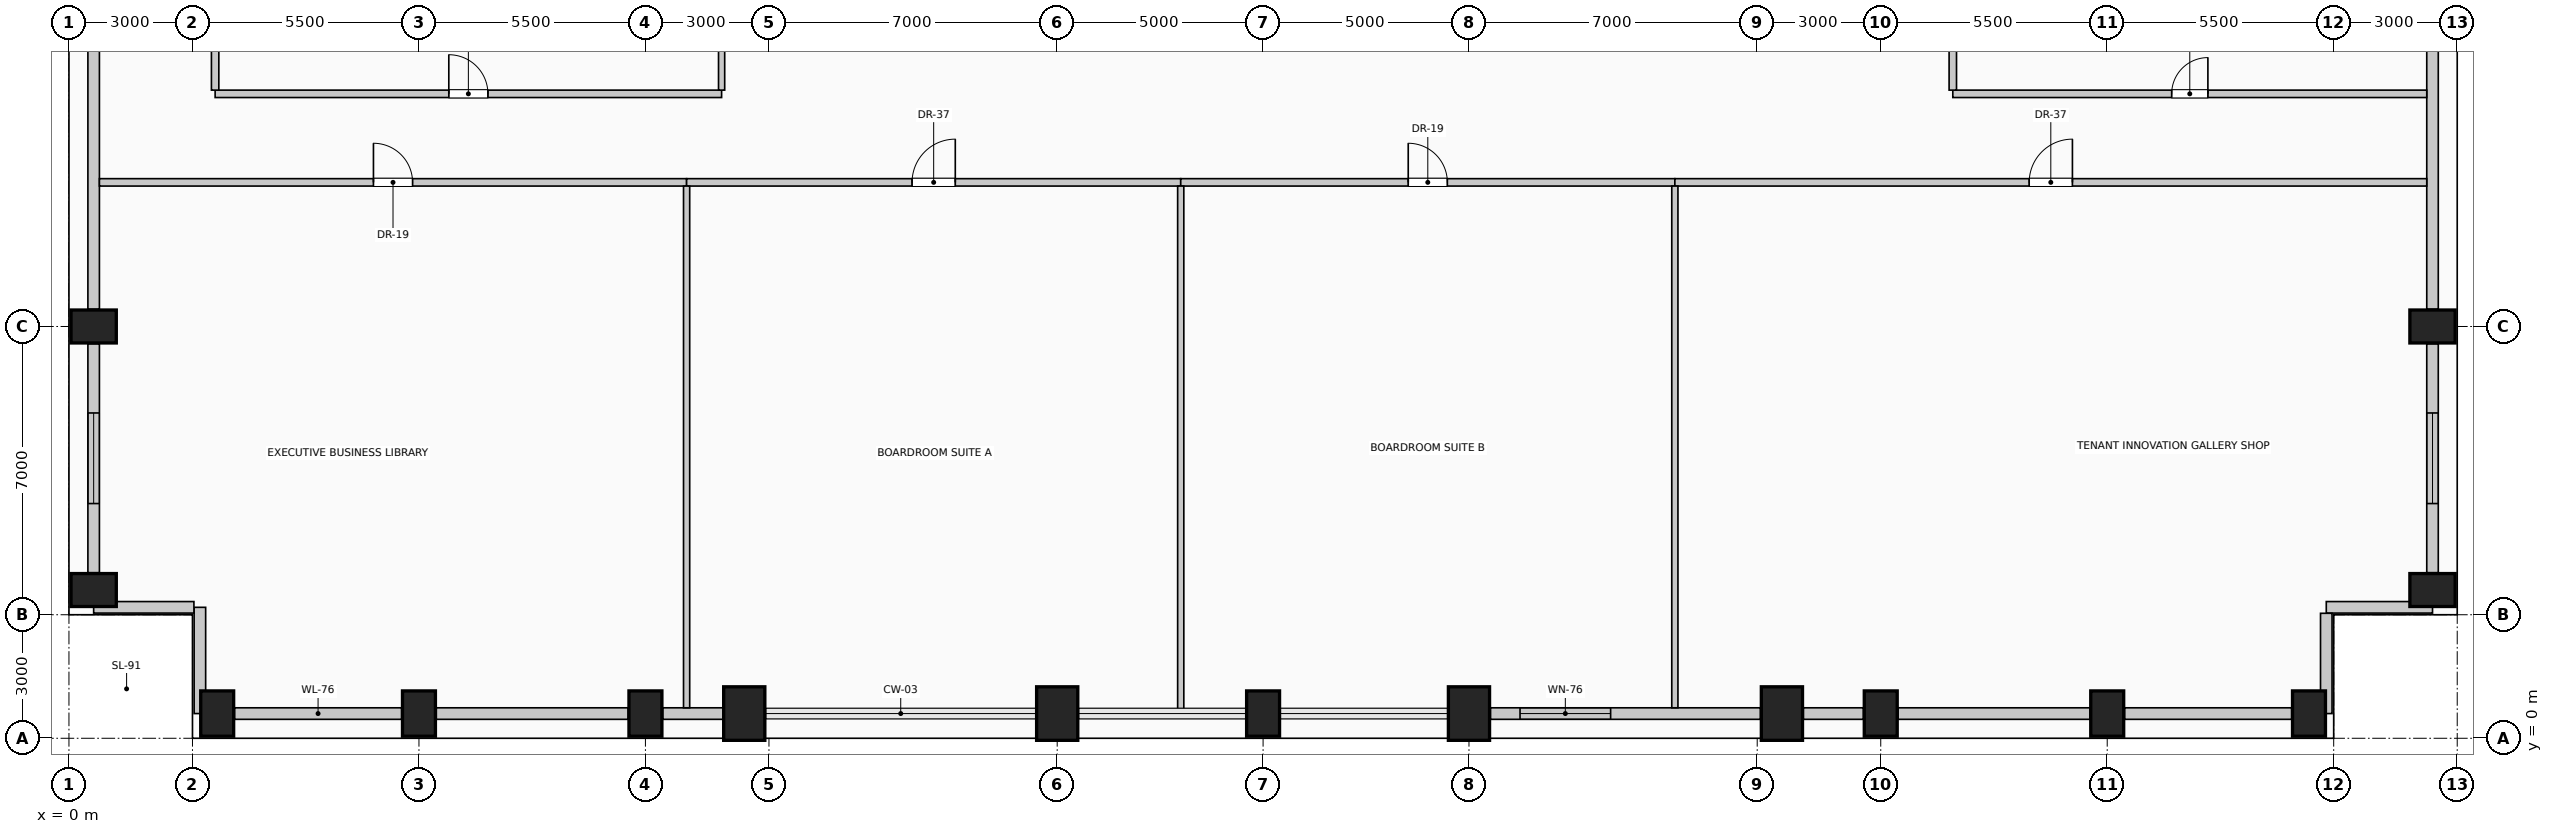
"""IFC4 building model, lengths in metres.
Left out: names, types, materials, properties, quantities, classifications, styles, units other than length and angle.
Written with IfcOpenShell. Run it as: python <this file> out.ifc"""

import sys

from ifc_helpers import new_model, si_unit, direction, frame, frame_2d, origin, origin_2d, place, context, subcontext, project, spatial, rectangle, extrude, element, fill, save


model = new_model("IFC4")
c1 = context("Model", 3, precision=1e-05, world=origin(), true_north=direction((0.0, 1.0)))
c2 = subcontext(c1, "Body", "Model", "MODEL_VIEW")
j1 = project(units=[si_unit("LENGTHUNIT", "METRE"), si_unit("PLANEANGLEUNIT", "RADIAN")], contexts=[c1])
p1 = place(None, origin())
s1 = spatial("IfcSite", under=j1, at=p1, CompositionType="ELEMENT")
p2 = place(p1, origin())
s2 = spatial("IfcBuilding", under=s1, at=p2, CompositionType="ELEMENT")
p3 = place(p2, frame((0.0, 0.0, 165.8)))
s3 = spatial("IfcBuildingStorey", under=s2, at=p3, CompositionType="ELEMENT", Elevation=165.8)
for number, where, z_axis, x_axis in (
    (1, (3.6, 0.6, 0.0), (0.0, 0.0, 1.0), (1.0, 0.0, 0.0)),
    (2, (8.5, 0.6, 0.0), (0.0, 0.0, 1.0), (1.0, 0.0, 0.0)),
    (3, (14.0, 0.6, 0.0), (0.0, 0.0, 1.0), (1.0, 0.0, 0.0)),
):
    element("IfcColumn", number, at=place(p3, frame(where, z_axis=z_axis, x_axis=x_axis)), inside=s3, PredefinedType="COLUMN", context=c2, shape_type="SweptSolid", body=[
        extrude(rectangle(XDim=0.8, YDim=1.1, at=origin_2d()), origin(), (0.0, 0.0, 1.0), 4.8),
    ])
for number, where, z_axis, x_axis in (
    (4, (16.4, 0.6, 0.0), (0.0, 0.0, 1.0), (1.0, 0.0, 0.0)),
    (5, (24.0, 0.6, 0.0), (0.0, 0.0, 1.0), (1.0, 0.0, 0.0)),
):
    element("IfcColumn", number, at=place(p3, frame(where, z_axis=z_axis, x_axis=x_axis)), inside=s3, PredefinedType="COLUMN", context=c2, shape_type="SweptSolid", body=[
        extrude(rectangle(XDim=1.0, YDim=1.3, at=origin_2d()), origin(), (0.0, 0.0, 1.0), 4.8),
    ])
p4 = place(p3, frame((29.0, 0.6, 0.0), z_axis=(0.0, 0.0, 1.0), x_axis=(1.0, 0.0, 0.0)))
e6 = element("IfcColumn", 6, at=p4, inside=s3, PredefinedType="COLUMN", context=c2, shape_type="SweptSolid", body=[
    extrude(rectangle(XDim=0.8, YDim=1.1, at=origin_2d()), origin(), (0.0, 0.0, 1.0), 4.8),
])
for number, where, z_axis, x_axis in (
    (7, (34.0, 0.6, 0.0), (0.0, 0.0, 1.0), (1.0, 0.0, 0.0)),
    (8, (41.6, 0.6, 0.0), (0.0, 0.0, 1.0), (1.0, 0.0, 0.0)),
):
    element("IfcColumn", number, at=place(p3, frame(where, z_axis=z_axis, x_axis=x_axis)), inside=s3, PredefinedType="COLUMN", context=c2, shape_type="SweptSolid", body=[
        extrude(rectangle(XDim=1.0, YDim=1.3, at=origin_2d()), origin(), (0.0, 0.0, 1.0), 4.8),
    ])
for number, where, z_axis, x_axis in (
    (9, (44.0, 0.6, 0.0), (0.0, 0.0, 1.0), (1.0, 0.0, 0.0)),
    (10, (49.5, 0.6, 0.0), (0.0, 0.0, 1.0), (1.0, 0.0, 0.0)),
    (11, (54.4, 0.6, 0.0), (0.0, 0.0, 1.0), (1.0, 0.0, 0.0)),
    (12, (0.6, 3.6, 0.0), (0.0, 0.0, 1.0), (0.0, 1.0, 0.0)),
    (13, (57.4, 3.6, 0.0), (0.0, 0.0, 1.0), (0.0, 1.0, 0.0)),
    (14, (0.6, 10.0, 0.0), (0.0, 0.0, 1.0), (0.0, 1.0, 0.0)),
    (15, (57.4, 10.0, 0.0), (0.0, 0.0, 1.0), (0.0, 1.0, 0.0)),
):
    element("IfcColumn", number, at=place(p3, frame(where, z_axis=z_axis, x_axis=x_axis)), inside=s3, PredefinedType="COLUMN", context=c2, shape_type="SweptSolid", body=[
        extrude(rectangle(XDim=0.8, YDim=1.1, at=origin_2d()), origin(), (0.0, 0.0, 1.0), 4.8),
    ])
p5 = place(p3, frame((8.08, 0.6, 0.0), z_axis=(0.0, 0.0, 1.0), x_axis=(-1.0, 0.0, 0.0)))
e16 = element("IfcWall", 16, at=p5, inside=s3, PredefinedType="SOLIDWALL", context=c2, shape_type="SweptSolid", body=[
    extrude(rectangle(XDim=4.06, YDim=0.28, at=frame_2d((2.03, 0.0))), origin(), (0.0, 0.0, 1.0), 3.675),
])
p6 = place(p3, frame((13.58, 0.6, 0.0), z_axis=(0.0, 0.0, 1.0), x_axis=(-1.0, 0.0, 0.0)))
e17 = element("IfcWall", 17, at=p6, inside=s3, PredefinedType="SOLIDWALL", context=c2, shape_type="SweptSolid", body=[
    extrude(rectangle(XDim=4.66, YDim=0.28, at=frame_2d((2.33, 0.0))), origin(), (0.0, 0.0, 1.0), 3.675),
])
p7 = place(p3, frame((15.88, 0.6, 0.0), z_axis=(0.0, 0.0, 1.0), x_axis=(-1.0, 0.0, 0.0)))
e18 = element("IfcWall", 18, at=p7, inside=s3, PredefinedType="SOLIDWALL", context=c2, shape_type="SweptSolid", body=[
    extrude(rectangle(XDim=1.46, YDim=0.28, at=frame_2d((0.73, 0.0))), origin(), (0.0, 0.0, 1.0), 3.675),
])
p8 = place(p3, frame((41.08, 0.6, 0.0), z_axis=(0.0, 0.0, 1.0), x_axis=(-1.0, 0.0, 0.0)))
e19 = element("IfcWall", 19, at=p8, inside=s3, PredefinedType="SOLIDWALL", context=c2, shape_type="SweptSolid", body=[
    extrude(rectangle(XDim=6.56, YDim=0.28, at=frame_2d((3.28, 0.0))), origin(), (0.0, 0.0, 1.0), 3.675),
])
p9 = place(p8, frame((3.64, 0.0, 0.5)))
e20 = element("IfcOpeningElement", 20, at=p9, cuts=e19, PredefinedType="OPENING", context=c2, shape_type="SweptSolid", body=[
    extrude(rectangle(XDim=2.2, YDim=1.95, at=frame_2d((1.1, 0.975))), frame((0.0, 0.15, 0.0), z_axis=(0.0, -1.0, 0.0), x_axis=(1.0, 0.0, 0.0)), (0.0, 0.0, 1.0), 0.3),
])
p10 = place(p3, frame((43.58, 0.6, 0.0), z_axis=(0.0, 0.0, 1.0), x_axis=(-1.0, 0.0, 0.0)))
e21 = element("IfcWall", 21, at=p10, inside=s3, PredefinedType="SOLIDWALL", context=c2, shape_type="SweptSolid", body=[
    extrude(rectangle(XDim=1.46, YDim=0.28, at=frame_2d((0.73, 0.0))), origin(), (0.0, 0.0, 1.0), 3.675),
])
p11 = place(p3, frame((49.08, 0.6, 0.0), z_axis=(0.0, 0.0, 1.0), x_axis=(-1.0, 0.0, 0.0)))
e22 = element("IfcWall", 22, at=p11, inside=s3, PredefinedType="SOLIDWALL", context=c2, shape_type="SweptSolid", body=[
    extrude(rectangle(XDim=4.66, YDim=0.28, at=frame_2d((2.33, 0.0))), origin(), (0.0, 0.0, 1.0), 3.675),
])
p12 = place(p3, frame((53.98, 0.6, 0.0), z_axis=(0.0, 0.0, 1.0), x_axis=(-1.0, 0.0, 0.0)))
e23 = element("IfcWall", 23, at=p12, inside=s3, PredefinedType="SOLIDWALL", context=c2, shape_type="SweptSolid", body=[
    extrude(rectangle(XDim=4.06, YDim=0.28, at=frame_2d((2.03, 0.0))), origin(), (0.0, 0.0, 1.0), 3.675),
])
p13 = place(p3, frame((0.6, 4.02, 0.0), z_axis=(0.0, 0.0, 1.0), x_axis=(0.0, 1.0, 0.0)))
e24 = element("IfcWall", 24, at=p13, inside=s3, PredefinedType="SOLIDWALL", context=c2, shape_type="SweptSolid", body=[
    extrude(rectangle(XDim=5.56, YDim=0.28, at=frame_2d((2.78, 0.0))), origin(), (0.0, 0.0, 1.0), 3.675),
])
p14 = place(p13, frame((1.68, 0.0, 0.5)))
e25 = element("IfcOpeningElement", 25, at=p14, cuts=e24, PredefinedType="OPENING", context=c2, shape_type="SweptSolid", body=[
    extrude(rectangle(XDim=2.2, YDim=1.95, at=frame_2d((1.1, 0.975))), frame((0.0, 0.15, 0.0), z_axis=(0.0, -1.0, 0.0), x_axis=(1.0, 0.0, 0.0)), (0.0, 0.0, 1.0), 0.3),
])
p15 = place(p3, frame((0.6, 10.42, 0.0), z_axis=(0.0, 0.0, 1.0), x_axis=(0.0, 1.0, 0.0)))
e26 = element("IfcWall", 26, at=p15, inside=s3, PredefinedType="SOLIDWALL", context=c2, shape_type="SweptSolid", body=[
    extrude(rectangle(XDim=7.16, YDim=0.28, at=frame_2d((3.58, 0.0))), origin(), (0.0, 0.0, 1.0), 3.675),
])
p16 = place(p3, frame((57.4, 9.58, 0.0), z_axis=(0.0, 0.0, 1.0), x_axis=(0.0, -1.0, 0.0)))
e27 = element("IfcWall", 27, at=p16, inside=s3, PredefinedType="SOLIDWALL", context=c2, shape_type="SweptSolid", body=[
    extrude(rectangle(XDim=5.56, YDim=0.28, at=frame_2d((2.78, 0.0))), origin(), (0.0, 0.0, 1.0), 3.675),
])
p17 = place(p16, frame((1.68, 0.0, 0.5)))
e28 = element("IfcOpeningElement", 28, at=p17, cuts=e27, PredefinedType="OPENING", context=c2, shape_type="SweptSolid", body=[
    extrude(rectangle(XDim=2.2, YDim=1.95, at=frame_2d((1.1, 0.975))), frame((0.0, 0.15, 0.0), z_axis=(0.0, -1.0, 0.0), x_axis=(1.0, 0.0, 0.0)), (0.0, 0.0, 1.0), 0.3),
])
p18 = place(p3, frame((57.4, 17.58, 0.0), z_axis=(0.0, 0.0, 1.0), x_axis=(0.0, -1.0, 0.0)))
e29 = element("IfcWall", 29, at=p18, inside=s3, PredefinedType="SOLIDWALL", context=c2, shape_type="SweptSolid", body=[
    extrude(rectangle(XDim=7.16, YDim=0.28, at=frame_2d((3.58, 0.0))), origin(), (0.0, 0.0, 1.0), 3.675),
])
p19 = place(p3, frame((57.4, 3.18, 0.0), z_axis=(0.0, 0.0, 1.0), x_axis=(-1.0, 0.0, 0.0)))
e30 = element("IfcWall", 30, at=p19, inside=s3, PredefinedType="SOLIDWALL", context=c2, shape_type="SweptSolid", body=[
    extrude(rectangle(XDim=2.58, YDim=0.28, at=frame_2d((1.29, 0.0))), origin(), (0.0, 0.0, 1.0), 4.525),
])
p20 = place(p3, frame((54.82, 3.035, 0.0), z_axis=(0.0, 0.0, 1.0), x_axis=(0.0, -1.0, 0.0)))
e31 = element("IfcWall", 31, at=p20, inside=s3, PredefinedType="SOLIDWALL", context=c2, shape_type="SweptSolid", body=[
    extrude(rectangle(XDim=2.435, YDim=0.28, at=frame_2d((1.217, 0.0))), origin(), (0.0, 0.0, 1.0), 4.525),
])
p21 = place(p3, frame((3.18, 0.6, 0.0), z_axis=(0.0, 0.0, 1.0), x_axis=(0.0, 1.0, 0.0)))
e32 = element("IfcWall", 32, at=p21, inside=s3, PredefinedType="SOLIDWALL", context=c2, shape_type="SweptSolid", body=[
    extrude(rectangle(XDim=2.58, YDim=0.28, at=frame_2d((1.29, 0.0))), origin(), (0.0, 0.0, 1.0), 4.525),
])
p22 = place(p3, frame((3.035, 3.18, 0.0), z_axis=(0.0, 0.0, 1.0), x_axis=(-1.0, 0.0, 0.0)))
e33 = element("IfcWall", 33, at=p22, inside=s3, PredefinedType="SOLIDWALL", context=c2, shape_type="SweptSolid", body=[
    extrude(rectangle(XDim=2.435, YDim=0.28, at=frame_2d((1.217, 0.0))), origin(), (0.0, 0.0, 1.0), 4.525),
])
p23 = place(p3, frame((0.74, 13.5, 0.0), z_axis=(0.0, 0.0, 1.0), x_axis=(1.0, 0.0, 0.0)))
e34 = element("IfcWall", 34, at=p23, inside=s3, PredefinedType="PARTITIONING", context=c2, shape_type="SweptSolid", body=[
    extrude(rectangle(XDim=14.26, YDim=0.18, at=frame_2d((7.13, 0.0))), origin(), (0.0, 0.0, 1.0), 4.525),
])
p24 = place(p23, frame((6.655, 0.0, 0.0)))
e35 = element("IfcOpeningElement", 35, at=p24, cuts=e34, PredefinedType="OPENING", context=c2, shape_type="SweptSolid", body=[
    extrude(rectangle(XDim=0.95, YDim=2.15, at=frame_2d((0.475, 1.075))), frame((0.0, 0.1, 0.0), z_axis=(0.0, -1.0, 0.0), x_axis=(1.0, 0.0, 0.0)), (0.0, 0.0, 1.0), 0.2),
])
p25 = place(p3, frame((15.0, 13.5, 0.0), z_axis=(0.0, 0.0, 1.0), x_axis=(1.0, 0.0, 0.0)))
e36 = element("IfcWall", 36, at=p25, inside=s3, PredefinedType="PARTITIONING", context=c2, shape_type="SweptSolid", body=[
    extrude(rectangle(XDim=12.0, YDim=0.18, at=frame_2d((6.0, 0.0))), origin(), (0.0, 0.0, 1.0), 4.525),
])
p26 = place(p25, frame((5.475, 0.0, 0.0)))
e37 = element("IfcOpeningElement", 37, at=p26, cuts=e36, PredefinedType="OPENING", context=c2, shape_type="SweptSolid", body=[
    extrude(rectangle(XDim=1.05, YDim=2.15, at=frame_2d((0.525, 1.075))), frame((0.0, 0.1, 0.0), z_axis=(0.0, -1.0, 0.0), x_axis=(1.0, 0.0, 0.0)), (0.0, 0.0, 1.0), 0.2),
])
p27 = place(p3, frame((27.0, 13.5, 0.0), z_axis=(0.0, 0.0, 1.0), x_axis=(1.0, 0.0, 0.0)))
e38 = element("IfcWall", 38, at=p27, inside=s3, PredefinedType="PARTITIONING", context=c2, shape_type="SweptSolid", body=[
    extrude(rectangle(XDim=12.0, YDim=0.18, at=frame_2d((6.0, 0.0))), origin(), (0.0, 0.0, 1.0), 4.525),
])
p28 = place(p27, frame((5.525, 0.0, 0.0)))
e39 = element("IfcOpeningElement", 39, at=p28, cuts=e38, PredefinedType="OPENING", context=c2, shape_type="SweptSolid", body=[
    extrude(rectangle(XDim=0.95, YDim=2.15, at=frame_2d((0.475, 1.075))), frame((0.0, 0.1, 0.0), z_axis=(0.0, -1.0, 0.0), x_axis=(1.0, 0.0, 0.0)), (0.0, 0.0, 1.0), 0.2),
])
p29 = place(p3, frame((39.0, 13.5, 0.0), z_axis=(0.0, 0.0, 1.0), x_axis=(1.0, 0.0, 0.0)))
e40 = element("IfcWall", 40, at=p29, inside=s3, PredefinedType="PARTITIONING", context=c2, shape_type="SweptSolid", body=[
    extrude(rectangle(XDim=18.26, YDim=0.18, at=frame_2d((9.13, 0.0))), origin(), (0.0, 0.0, 1.0), 4.525),
])
p30 = place(p29, frame((8.605, 0.0, 0.0)))
e41 = element("IfcOpeningElement", 41, at=p30, cuts=e40, PredefinedType="OPENING", context=c2, shape_type="SweptSolid", body=[
    extrude(rectangle(XDim=1.05, YDim=2.15, at=frame_2d((0.525, 1.075))), frame((0.0, 0.1, 0.0), z_axis=(0.0, -1.0, 0.0), x_axis=(1.0, 0.0, 0.0)), (0.0, 0.0, 1.0), 0.2),
])
p31 = place(p3, frame((3.55, 15.65, 0.0), z_axis=(0.0, 0.0, 1.0), x_axis=(1.0, 0.0, 0.0)))
e42 = element("IfcWall", 42, at=p31, inside=s3, PredefinedType="PARTITIONING", context=c2, shape_type="SweptSolid", body=[
    extrude(rectangle(XDim=12.3, YDim=0.18, at=frame_2d((6.15, 0.0))), origin(), (0.0, 0.0, 1.0), 4.525),
])
p32 = place(p31, frame((5.675, 0.0, 0.0)))
e43 = element("IfcOpeningElement", 43, at=p32, cuts=e42, PredefinedType="OPENING", context=c2, shape_type="SweptSolid", body=[
    extrude(rectangle(XDim=0.95, YDim=2.15, at=frame_2d((0.475, 1.075))), frame((0.0, 0.1, 0.0), z_axis=(0.0, -1.0, 0.0), x_axis=(1.0, 0.0, 0.0)), (0.0, 0.0, 1.0), 0.2),
])
p33 = place(p3, frame((45.75, 15.65, 0.0), z_axis=(0.0, 0.0, 1.0), x_axis=(1.0, 0.0, 0.0)))
e44 = element("IfcWall", 44, at=p33, inside=s3, PredefinedType="PARTITIONING", context=c2, shape_type="SweptSolid", body=[
    extrude(rectangle(XDim=11.51, YDim=0.18, at=frame_2d((5.755, 0.0))), origin(), (0.0, 0.0, 1.0), 4.525),
])
p34 = place(p33, frame((5.315, 0.0, 0.0)))
e45 = element("IfcOpeningElement", 45, at=p34, cuts=e44, PredefinedType="OPENING", context=c2, shape_type="SweptSolid", body=[
    extrude(rectangle(XDim=0.88, YDim=2.1, at=frame_2d((0.44, 1.05))), frame((0.0, 0.1, 0.0), z_axis=(0.0, -1.0, 0.0), x_axis=(1.0, 0.0, 0.0)), (0.0, 0.0, 1.0), 0.2),
])
p35 = place(p3, frame((3.55, 15.74, 0.0), z_axis=(0.0, 0.0, 1.0), x_axis=(0.0, 1.0, 0.0)))
e46 = element("IfcWall", 46, at=p35, inside=s3, PredefinedType="PARTITIONING", context=c2, shape_type="SweptSolid", body=[
    extrude(rectangle(XDim=3.135, YDim=0.18, at=frame_2d((1.567, 0.0))), origin(), (0.0, 0.0, 1.0), 4.525),
])
p36 = place(p3, frame((15.0, 0.74, 0.0), z_axis=(0.0, 0.0, 1.0), x_axis=(0.0, 1.0, 0.0)))
e47 = element("IfcWall", 47, at=p36, inside=s3, PredefinedType="PARTITIONING", context=c2, shape_type="SweptSolid", body=[
    extrude(rectangle(XDim=12.67, YDim=0.15, at=frame_2d((6.335, 0.0))), origin(), (0.0, 0.0, 1.0), 4.525),
])
p37 = place(p3, frame((15.85, 15.74, 0.0), z_axis=(0.0, 0.0, 1.0), x_axis=(0.0, 1.0, 0.0)))
e48 = element("IfcWall", 48, at=p37, inside=s3, PredefinedType="PARTITIONING", context=c2, shape_type="SweptSolid", body=[
    extrude(rectangle(XDim=3.147, YDim=0.15, at=frame_2d((1.574, 0.0))), origin(), (0.0, 0.0, 1.0), 4.525),
])
p38 = place(p3, frame((27.0, 0.6, 0.0), z_axis=(0.0, 0.0, 1.0), x_axis=(0.0, 1.0, 0.0)))
e49 = element("IfcWall", 49, at=p38, inside=s3, PredefinedType="PARTITIONING", context=c2, shape_type="SweptSolid", body=[
    extrude(rectangle(XDim=12.81, YDim=0.15, at=frame_2d((6.405, 0.0))), origin(), (0.0, 0.0, 1.0), 4.525),
])
p39 = place(p3, frame((39.0, 0.74, 0.0), z_axis=(0.0, 0.0, 1.0), x_axis=(0.0, 1.0, 0.0)))
e50 = element("IfcWall", 50, at=p39, inside=s3, PredefinedType="PARTITIONING", context=c2, shape_type="SweptSolid", body=[
    extrude(rectangle(XDim=12.67, YDim=0.15, at=frame_2d((6.335, 0.0))), origin(), (0.0, 0.0, 1.0), 4.525),
])
p40 = place(p3, frame((45.75, 15.74, 0.0), z_axis=(0.0, 0.0, 1.0), x_axis=(0.0, 1.0, 0.0)))
e51 = element("IfcWall", 51, at=p40, inside=s3, PredefinedType="PARTITIONING", context=c2, shape_type="SweptSolid", body=[
    extrude(rectangle(XDim=16.535, YDim=0.18, at=frame_2d((8.268, 0.0))), origin(), (0.0, 0.0, 1.0), 4.525),
])
p41 = place(p9, origin())
e52 = element("IfcWindow", 52, at=p41, inside=s3, PartitioningType="SINGLE_PANEL", PredefinedType="WINDOW", context=c2, shape_type="SweptSolid", body=[
    extrude(rectangle(XDim=2.2, YDim=1.95, at=frame_2d((1.1, 0.975))), frame((0.0, 0.03, 0.0), z_axis=(0.0, -1.0, 0.0), x_axis=(1.0, 0.0, 0.0)), (0.0, 0.0, 1.0), 0.06),
])
fill(e20, e52)
p42 = place(p14, origin())
e53 = element("IfcWindow", 53, at=p42, inside=s3, PartitioningType="SINGLE_PANEL", PredefinedType="WINDOW", context=c2, shape_type="SweptSolid", body=[
    extrude(rectangle(XDim=2.2, YDim=1.95, at=frame_2d((1.1, 0.975))), frame((0.0, 0.03, 0.0), z_axis=(0.0, -1.0, 0.0), x_axis=(1.0, 0.0, 0.0)), (0.0, 0.0, 1.0), 0.06),
])
fill(e25, e53)
p43 = place(p17, origin())
e54 = element("IfcWindow", 54, at=p43, inside=s3, PartitioningType="SINGLE_PANEL", PredefinedType="WINDOW", context=c2, shape_type="SweptSolid", body=[
    extrude(rectangle(XDim=2.2, YDim=1.95, at=frame_2d((1.1, 0.975))), frame((0.0, 0.03, 0.0), z_axis=(0.0, -1.0, 0.0), x_axis=(1.0, 0.0, 0.0)), (0.0, 0.0, 1.0), 0.06),
])
fill(e28, e54)
p44 = place(p24, origin())
e55 = element("IfcDoor", 55, at=p44, inside=s3, OperationType="SINGLE_SWING_LEFT", PredefinedType="DOOR", context=c2, shape_type="SweptSolid", body=[
    extrude(rectangle(XDim=0.95, YDim=2.15, at=frame_2d((0.475, 1.075))), frame((0.0, 0.025, 0.0), z_axis=(0.0, -1.0, 0.0), x_axis=(1.0, 0.0, 0.0)), (0.0, 0.0, 1.0), 0.05),
])
fill(e35, e55)
p45 = place(p26, origin())
e56 = element("IfcDoor", 56, at=p45, inside=s3, OperationType="SINGLE_SWING_RIGHT", PredefinedType="DOOR", context=c2, shape_type="SweptSolid", body=[
    extrude(rectangle(XDim=1.05, YDim=2.15, at=frame_2d((0.525, 1.075))), frame((0.0, 0.025, 0.0), z_axis=(0.0, -1.0, 0.0), x_axis=(1.0, 0.0, 0.0)), (0.0, 0.0, 1.0), 0.05),
])
fill(e37, e56)
p46 = place(p28, origin())
e57 = element("IfcDoor", 57, at=p46, inside=s3, OperationType="SINGLE_SWING_LEFT", PredefinedType="DOOR", context=c2, shape_type="SweptSolid", body=[
    extrude(rectangle(XDim=0.95, YDim=2.15, at=frame_2d((0.475, 1.075))), frame((0.0, 0.025, 0.0), z_axis=(0.0, -1.0, 0.0), x_axis=(1.0, 0.0, 0.0)), (0.0, 0.0, 1.0), 0.05),
])
fill(e39, e57)
p47 = place(p30, origin())
e58 = element("IfcDoor", 58, at=p47, inside=s3, OperationType="SINGLE_SWING_RIGHT", PredefinedType="DOOR", context=c2, shape_type="SweptSolid", body=[
    extrude(rectangle(XDim=1.05, YDim=2.15, at=frame_2d((0.525, 1.075))), frame((0.0, 0.025, 0.0), z_axis=(0.0, -1.0, 0.0), x_axis=(1.0, 0.0, 0.0)), (0.0, 0.0, 1.0), 0.05),
])
fill(e41, e58)
p48 = place(p32, origin())
e59 = element("IfcDoor", 59, at=p48, inside=s3, OperationType="SINGLE_SWING_LEFT", PredefinedType="DOOR", context=c2, shape_type="SweptSolid", body=[
    extrude(rectangle(XDim=0.95, YDim=2.15, at=frame_2d((0.475, 1.075))), frame((0.0, 0.025, 0.0), z_axis=(0.0, -1.0, 0.0), x_axis=(1.0, 0.0, 0.0)), (0.0, 0.0, 1.0), 0.05),
])
fill(e43, e59)
p49 = place(p34, origin())
e60 = element("IfcDoor", 60, at=p49, inside=s3, OperationType="SINGLE_SWING_RIGHT", PredefinedType="DOOR", context=c2, shape_type="SweptSolid", body=[
    extrude(rectangle(XDim=0.88, YDim=2.1, at=frame_2d((0.44, 1.05))), frame((0.0, 0.025, 0.0), z_axis=(0.0, -1.0, 0.0), x_axis=(1.0, 0.0, 0.0)), (0.0, 0.0, 1.0), 0.05),
])
fill(e45, e60)
save(model, sys.argv[1])
